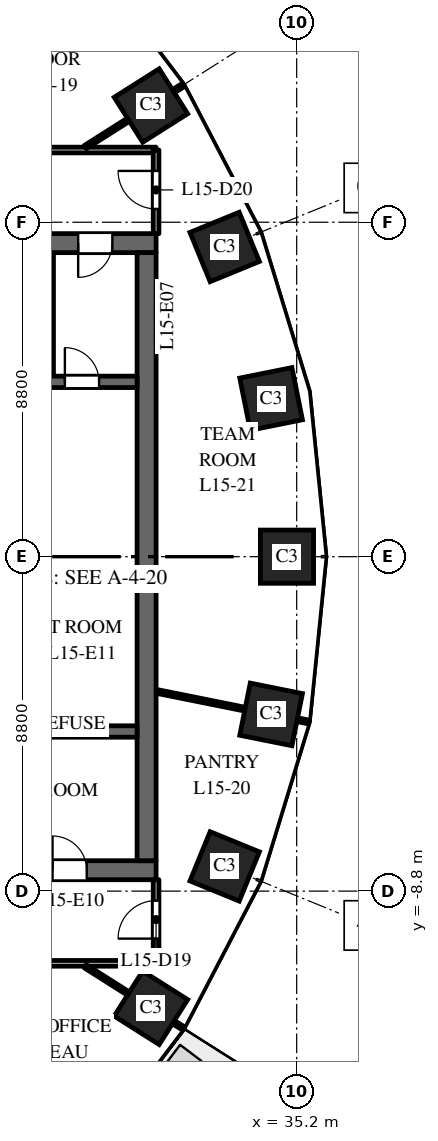
"""IFC4 building model, lengths in metres.
Left out: names, types, materials, properties, quantities, classifications, styles, units other than length and angle.
Written with IfcOpenShell. Run it as: python <this file> out.ifc"""

import sys

from ifc_helpers import new_model, si_unit, direction, frame, frame_2d, origin, origin_2d, place, context, subcontext, project, spatial, rectangle, extrude, element, fill, save


model = new_model("IFC4")
c1 = context("Model", 3, precision=1e-05, world=origin(), true_north=direction((0.0, 1.0)))
c2 = subcontext(c1, "Body", "Model", "MODEL_VIEW")
j1 = project(units=[si_unit("LENGTHUNIT", "METRE"), si_unit("PLANEANGLEUNIT", "RADIAN")], contexts=[c1])
p1 = place(None, origin())
s1 = spatial("IfcSite", under=j1, at=p1, CompositionType="ELEMENT")
p2 = place(p1, origin())
s2 = spatial("IfcBuilding", under=s1, at=p2, CompositionType="ELEMENT")
p3 = place(p2, frame((0.0, 0.0, 70.5)))
s3 = spatial("IfcBuildingStorey", under=s2, at=p3, CompositionType="ELEMENT", Elevation=70.5)
for number, where, z_axis, x_axis in (
    (1, (34.945, 0.0, 0.0), (0.0, 0.0, 1.0), (0.0, 1.0, 0.0)),
    (2, (34.527, 4.151, 0.0), (0.0, 0.0, 1.0), (-0.197, 0.98, 0.0)),
    (3, (33.305, 8.149, 0.0), (0.0, 0.0, 1.0), (-0.379, 0.925, 0.0)),
    (4, (31.365, 11.871, 0.0), (0.0, 0.0, 1.0), (-0.535, 0.845, 0.0)),
    (5, (31.365, -11.871, 0.0), (0.0, 0.0, 1.0), (0.535, 0.845, 0.0)),
    (6, (33.305, -8.149, 0.0), (0.0, 0.0, 1.0), (0.379, 0.925, 0.0)),
    (7, (34.527, -4.151, 0.0), (0.0, 0.0, 1.0), (0.197, 0.98, 0.0)),
):
    element("IfcColumn", number, at=place(p3, frame(where, z_axis=z_axis, x_axis=x_axis)), inside=s3, PredefinedType="COLUMN", context=c2, shape_type="SweptSolid", body=[
        extrude(rectangle(XDim=1.4, YDim=1.4, at=origin_2d()), origin(), (0.0, 0.0, 1.0), 4.0),
    ])
p4 = place(p3, frame((16.5, 8.25, 0.0), z_axis=(0.0, 0.0, 1.0), x_axis=(1.0, 0.0, 0.0)))
e8 = element("IfcWall", 8, at=p4, inside=s3, PredefinedType="SHEAR", context=c2, shape_type="SweptSolid", body=[
    extrude(rectangle(XDim=15.0, YDim=0.5, at=frame_2d((7.5, 0.0))), origin(), (0.0, 0.0, 1.0), 3.7),
])
p5 = place(p4, frame((6.9, 0.0, 0.0)))
e9 = element("IfcOpeningElement", 9, at=p5, cuts=e8, PredefinedType="OPENING", context=c2, shape_type="SweptSolid", body=[
    extrude(rectangle(XDim=1.2, YDim=2.1, at=frame_2d((0.6, 1.05))), frame((0.0, 0.26, 0.0), z_axis=(0.0, -1.0, 0.0), x_axis=(1.0, 0.0, 0.0)), (0.0, 0.0, 1.0), 0.52),
])
p6 = place(p4, frame((12.95, 0.0, 0.0)))
e10 = element("IfcOpeningElement", 10, at=p6, cuts=e8, PredefinedType="OPENING", context=c2, shape_type="SweptSolid", body=[
    extrude(rectangle(XDim=0.9, YDim=2.1, at=frame_2d((0.45, 1.05))), frame((0.0, 0.26, 0.0), z_axis=(0.0, -1.0, 0.0), x_axis=(1.0, 0.0, 0.0)), (0.0, 0.0, 1.0), 0.52),
])
p7 = place(p3, frame((16.5, -8.25, 0.0), z_axis=(0.0, 0.0, 1.0), x_axis=(1.0, 0.0, 0.0)))
e11 = element("IfcWall", 11, at=p7, inside=s3, PredefinedType="SHEAR", context=c2, shape_type="SweptSolid", body=[
    extrude(rectangle(XDim=15.0, YDim=0.5, at=frame_2d((7.5, 0.0))), origin(), (0.0, 0.0, 1.0), 3.7),
])
p8 = place(p7, frame((6.9, 0.0, 0.0)))
e12 = element("IfcOpeningElement", 12, at=p8, cuts=e11, PredefinedType="OPENING", context=c2, shape_type="SweptSolid", body=[
    extrude(rectangle(XDim=1.2, YDim=2.1, at=frame_2d((0.6, 1.05))), frame((0.0, 0.26, 0.0), z_axis=(0.0, -1.0, 0.0), x_axis=(1.0, 0.0, 0.0)), (0.0, 0.0, 1.0), 0.52),
])
p9 = place(p7, frame((12.275, 0.0, 0.0)))
e13 = element("IfcOpeningElement", 13, at=p9, cuts=e11, PredefinedType="OPENING", context=c2, shape_type="SweptSolid", body=[
    extrude(rectangle(XDim=0.9, YDim=2.1, at=frame_2d((0.45, 1.05))), frame((0.0, 0.26, 0.0), z_axis=(0.0, -1.0, 0.0), x_axis=(1.0, 0.0, 0.0)), (0.0, 0.0, 1.0), 0.52),
])
p10 = place(p3, frame((31.25, -8.0, 0.0), z_axis=(0.0, 0.0, 1.0), x_axis=(0.0, 1.0, 0.0)))
e14 = element("IfcWall", 14, at=p10, inside=s3, PredefinedType="SHEAR", context=c2, shape_type="SweptSolid", body=[
    extrude(rectangle(XDim=16.0, YDim=0.5, at=frame_2d((8.0, 0.0))), origin(), (0.0, 0.0, 1.0), 3.7),
])
p11 = place(p3, frame((24.9, 4.6, 0.0), z_axis=(0.0, 0.0, 1.0), x_axis=(1.0, 0.0, 0.0)))
e15 = element("IfcWall", 15, at=p11, inside=s3, PredefinedType="SHEAR", context=c2, shape_type="SweptSolid", body=[
    extrude(rectangle(XDim=6.1, YDim=0.3, at=frame_2d((3.05, 0.0))), origin(), (0.0, 0.0, 1.0), 3.7),
])
p12 = place(p11, frame((4.2, 0.0, 0.0)))
e16 = element("IfcOpeningElement", 16, at=p12, cuts=e15, PredefinedType="OPENING", context=c2, shape_type="SweptSolid", body=[
    extrude(rectangle(XDim=0.9, YDim=2.1, at=frame_2d((0.45, 1.05))), frame((0.0, 0.16, 0.0), z_axis=(0.0, -1.0, 0.0), x_axis=(1.0, 0.0, 0.0)), (0.0, 0.0, 1.0), 0.32),
])
p13 = place(p3, frame((28.7, 4.75, 0.0), z_axis=(0.0, 0.0, 1.0), x_axis=(0.0, 1.0, 0.0)))
e17 = element("IfcWall", 17, at=p13, inside=s3, PredefinedType="PARTITIONING", context=c2, shape_type="SweptSolid", body=[
    extrude(rectangle(XDim=3.25, YDim=0.2, at=frame_2d((1.625, 0.0))), origin(), (0.0, 0.0, 1.0), 3.7),
])
p14 = place(p3, frame((24.9, -4.6, 0.0), z_axis=(0.0, 0.0, 1.0), x_axis=(1.0, 0.0, 0.0)))
e18 = element("IfcWall", 18, at=p14, inside=s3, PredefinedType="SHEAR", context=c2, shape_type="SweptSolid", body=[
    extrude(rectangle(XDim=6.1, YDim=0.3, at=frame_2d((3.05, 0.0))), origin(), (0.0, 0.0, 1.0), 3.7),
])
p15 = place(p3, frame((21.32, -10.7, 0.0), z_axis=(0.0, 0.0, 1.0), x_axis=(1.0, 0.0, 0.0)))
e19 = element("IfcWall", 19, at=p15, inside=s3, PredefinedType="PARTITIONING", context=c2, shape_type="SweptSolid", body=[
    extrude(rectangle(XDim=10.18, YDim=0.15, at=frame_2d((5.09, 0.0))), origin(), (0.0, 0.0, 1.0), 2.85),
])
p16 = place(p15, frame((0.542, 0.0, 0.0)))
e20 = element("IfcOpeningElement", 20, at=p16, cuts=e19, PredefinedType="OPENING", context=c2, shape_type="SweptSolid", body=[
    extrude(rectangle(XDim=1.0, YDim=2.1, at=frame_2d((0.5, 1.05))), frame((0.0, 0.085, 0.0), z_axis=(0.0, -1.0, 0.0), x_axis=(1.0, 0.0, 0.0)), (0.0, 0.0, 1.0), 0.17),
])
p17 = place(p3, frame((21.32, 10.7, 0.0), z_axis=(0.0, 0.0, 1.0), x_axis=(1.0, 0.0, 0.0)))
e21 = element("IfcWall", 21, at=p17, inside=s3, PredefinedType="PARTITIONING", context=c2, shape_type="SweptSolid", body=[
    extrude(rectangle(XDim=10.18, YDim=0.15, at=frame_2d((5.09, 0.0))), origin(), (0.0, 0.0, 1.0), 2.85),
])
p18 = place(p17, frame((0.551, 0.0, 0.0)))
e22 = element("IfcOpeningElement", 22, at=p18, cuts=e21, PredefinedType="OPENING", context=c2, shape_type="SweptSolid", body=[
    extrude(rectangle(XDim=1.0, YDim=2.1, at=frame_2d((0.5, 1.05))), frame((0.0, 0.085, 0.0), z_axis=(0.0, -1.0, 0.0), x_axis=(1.0, 0.0, 0.0)), (0.0, 0.0, 1.0), 0.17),
])
for number, where, z_axis, x_axis in (
    (23, (29.637, -10.777, 0.0), (0.0, 0.0, 1.0), (0.845, -0.535, 0.0)),
    (24, (29.637, 10.777, 0.0), (0.0, 0.0, 1.0), (0.845, 0.535, 0.0)),
):
    element("IfcWall", number, at=place(p3, frame(where, z_axis=z_axis, x_axis=x_axis)), inside=s3, PredefinedType="PARTITIONING", context=c2, shape_type="SweptSolid", body=[
        extrude(rectangle(XDim=3.048, YDim=0.1, at=frame_2d((1.524, 0.0))), origin(), (0.0, 0.0, 1.0), 2.85),
    ])
p19 = place(p3, frame((31.5, -10.7, 0.0), z_axis=(0.0, 0.0, 1.0), x_axis=(0.0, 1.0, 0.0)))
e25 = element("IfcWall", 25, at=p19, inside=s3, PredefinedType="PARTITIONING", context=c2, shape_type="SweptSolid", body=[
    extrude(rectangle(XDim=2.2, YDim=0.15, at=frame_2d((1.1, 0.0))), origin(), (0.0, 0.0, 1.0), 2.85),
])
p20 = place(p19, frame((0.65, 0.0, 0.0)))
e26 = element("IfcOpeningElement", 26, at=p20, cuts=e25, PredefinedType="OPENING", context=c2, shape_type="SweptSolid", body=[
    extrude(rectangle(XDim=1.0, YDim=2.1, at=frame_2d((0.5, 1.05))), frame((0.0, 0.085, 0.0), z_axis=(0.0, -1.0, 0.0), x_axis=(1.0, 0.0, 0.0)), (0.0, 0.0, 1.0), 0.17),
])
p21 = place(p3, frame((31.5, -3.542, 0.0), z_axis=(0.0, 0.0, 1.0), x_axis=(0.980357474535, -0.197228857227, 0.0)))
e27 = element("IfcWall", 27, at=p21, inside=s3, PredefinedType="PARTITIONING", context=c2, shape_type="SweptSolid", body=[
    extrude(rectangle(XDim=4.092, YDim=0.1, at=frame_2d((2.046, 0.0))), origin(), (0.0, 0.0, 1.0), 2.85),
])
p22 = place(p3, frame((31.5, 8.5, 0.0), z_axis=(0.0, 0.0, 1.0), x_axis=(0.0, 1.0, 0.0)))
e28 = element("IfcWall", 28, at=p22, inside=s3, PredefinedType="PARTITIONING", context=c2, shape_type="SweptSolid", body=[
    extrude(rectangle(XDim=2.2, YDim=0.15, at=frame_2d((1.1, 0.0))), origin(), (0.0, 0.0, 1.0), 2.85),
])
p23 = place(p22, frame((0.65, 0.0, 0.0)))
e29 = element("IfcOpeningElement", 29, at=p23, cuts=e28, PredefinedType="OPENING", context=c2, shape_type="SweptSolid", body=[
    extrude(rectangle(XDim=1.0, YDim=2.1, at=frame_2d((0.5, 1.05))), frame((0.0, 0.085, 0.0), z_axis=(0.0, -1.0, 0.0), x_axis=(1.0, 0.0, 0.0)), (0.0, 0.0, 1.0), 0.17),
])
p24 = place(p6, origin())
e30 = element("IfcDoor", 30, at=p24, inside=s3, OperationType="SINGLE_SWING_LEFT", PredefinedType="DOOR", context=c2, shape_type="SweptSolid", body=[
    extrude(rectangle(XDim=0.9, YDim=2.1, at=frame_2d((0.45, 1.05))), frame((0.0, 0.025, 0.0), z_axis=(0.0, -1.0, 0.0), x_axis=(1.0, 0.0, 0.0)), (0.0, 0.0, 1.0), 0.05),
])
fill(e10, e30)
p25 = place(p9, origin())
e31 = element("IfcDoor", 31, at=p25, inside=s3, OperationType="SINGLE_SWING_RIGHT", PredefinedType="DOOR", context=c2, shape_type="SweptSolid", body=[
    extrude(rectangle(XDim=0.9, YDim=2.1, at=frame_2d((0.45, 1.05))), frame((0.0, 0.025, 0.0), z_axis=(0.0, -1.0, 0.0), x_axis=(1.0, 0.0, 0.0)), (0.0, 0.0, 1.0), 0.05),
])
fill(e13, e31)
p26 = place(p12, origin())
e32 = element("IfcDoor", 32, at=p26, inside=s3, OperationType="SINGLE_SWING_RIGHT", PredefinedType="DOOR", context=c2, shape_type="SweptSolid", body=[
    extrude(rectangle(XDim=0.9, YDim=2.1, at=frame_2d((0.45, 1.05))), frame((0.0, 0.025, 0.0), z_axis=(0.0, -1.0, 0.0), x_axis=(1.0, 0.0, 0.0)), (0.0, 0.0, 1.0), 0.05),
])
fill(e16, e32)
p27 = place(p20, origin())
e33 = element("IfcDoor", 33, at=p27, inside=s3, OperationType="SINGLE_SWING_LEFT", PredefinedType="DOOR", context=c2, shape_type="SweptSolid", body=[
    extrude(rectangle(XDim=1.0, YDim=2.1, at=frame_2d((0.5, 1.05))), frame((0.0, 0.025, 0.0), z_axis=(0.0, -1.0, 0.0), x_axis=(1.0, 0.0, 0.0)), (0.0, 0.0, 1.0), 0.05),
])
fill(e26, e33)
p28 = place(p23, origin())
e34 = element("IfcDoor", 34, at=p28, inside=s3, OperationType="SINGLE_SWING_RIGHT", PredefinedType="DOOR", context=c2, shape_type="SweptSolid", body=[
    extrude(rectangle(XDim=1.0, YDim=2.1, at=frame_2d((0.5, 1.05))), frame((0.0, 0.025, 0.0), z_axis=(0.0, -1.0, 0.0), x_axis=(1.0, 0.0, 0.0)), (0.0, 0.0, 1.0), 0.05),
])
fill(e29, e34)
save(model, sys.argv[1])
